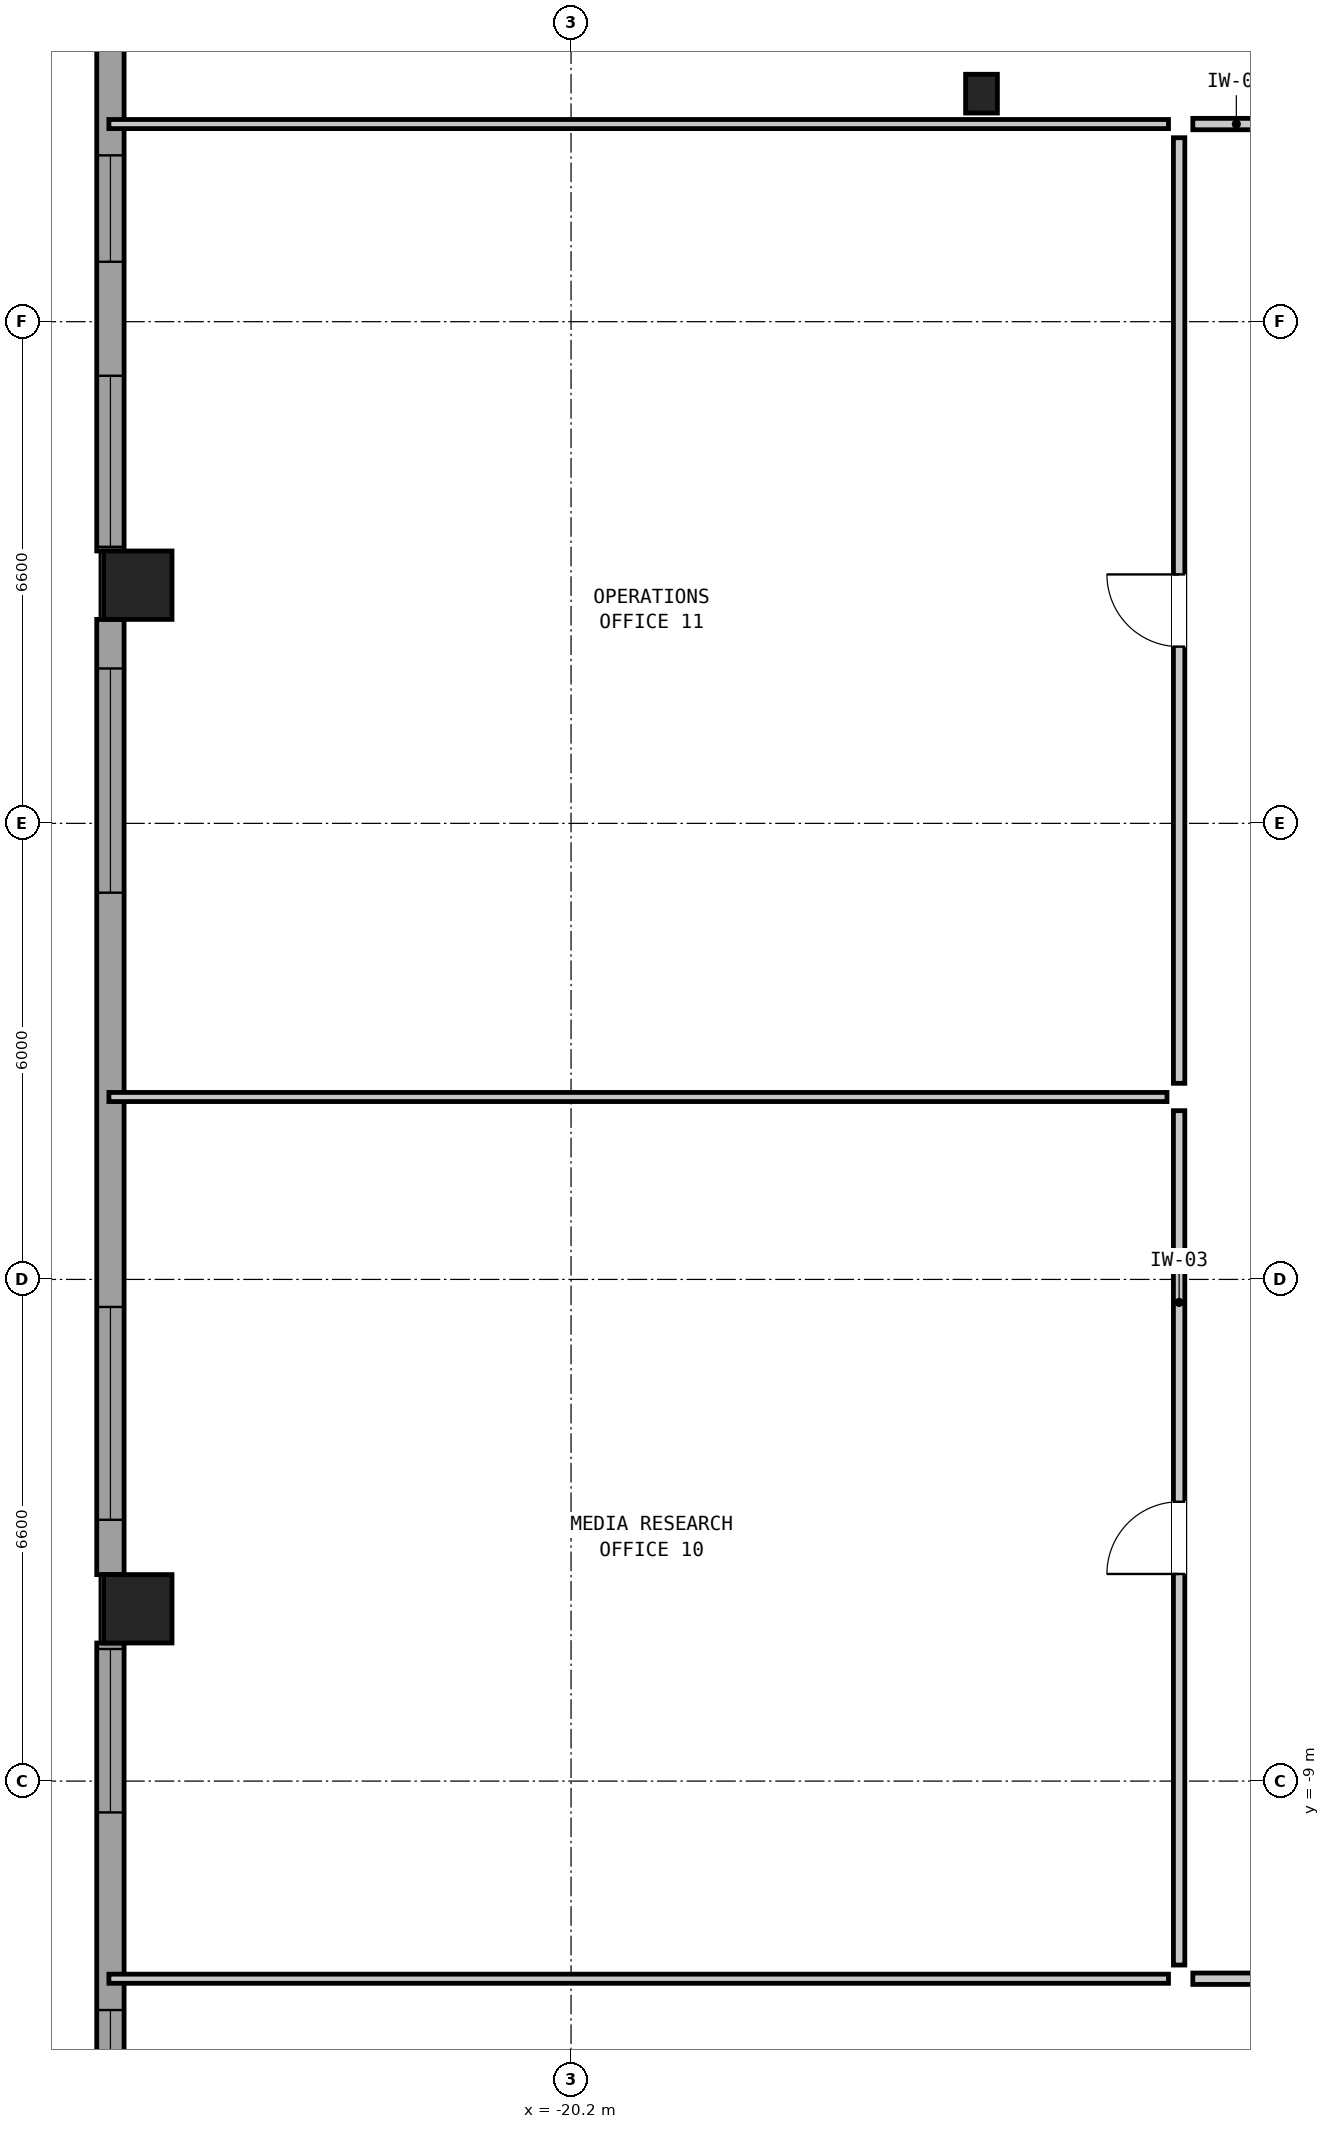
"""IFC4 building model, lengths in metres.
Left out: names, types, materials, properties, quantities, classifications, styles, units other than length and angle.
Written with IfcOpenShell. Run it as: python <this file> out.ifc"""

import sys

from ifc_helpers import new_model, si_unit, direction, frame, frame_2d, origin, origin_2d, place, context, subcontext, project, spatial, rectangle, hollow_rectangle, i_section, extrude, element, fill, save


model = new_model("IFC4")
c1 = context("Model", 3, precision=1e-05, world=origin(), true_north=direction((0.0, 1.0)))
c2 = subcontext(c1, "Body", "Model", "MODEL_VIEW")
j1 = project(units=[si_unit("LENGTHUNIT", "METRE"), si_unit("PLANEANGLEUNIT", "RADIAN")], contexts=[c1])
p1 = place(None, origin())
s1 = spatial("IfcSite", under=j1, at=p1, CompositionType="ELEMENT")
p2 = place(p1, origin())
s2 = spatial("IfcBuilding", under=s1, at=p2, CompositionType="ELEMENT")
p3 = place(p2, frame((0.0, 0.0, 35.25)))
s3 = spatial("IfcBuildingStorey", under=s2, at=p3, CompositionType="ELEMENT", Elevation=35.25)
for number, where, z_axis, x_axis in (
    (1, (-25.9, 6.733, 0.0), (0.0, 0.0, 1.0), (0.0, 1.0, 0.0)),
    (2, (-25.9, -6.733, 0.0), (0.0, 0.0, 1.0), (0.0, 1.0, 0.0)),
):
    element("IfcColumn", number, at=place(p3, frame(where, z_axis=z_axis, x_axis=x_axis)), inside=s3, PredefinedType="COLUMN", context=c2, shape_type="SweptSolid", body=[
        extrude(hollow_rectangle(XDim=0.9, YDim=0.9, WallThickness=0.055, at=origin_2d()), origin(), (0.0, 0.0, 1.0), 3.05),
    ])
p4 = place(p3, frame((-14.8, 13.2, 0.0), z_axis=(0.0, 0.0, 1.0), x_axis=(1.0, 0.0, 0.0)))
e3 = element("IfcColumn", 3, at=p4, inside=s3, PredefinedType="COLUMN", context=c2, shape_type="SweptSolid", body=[
    extrude(i_section(OverallWidth=0.418, OverallDepth=0.51, WebThickness=0.042, FlangeThickness=0.068, at=origin_2d()), origin(), (0.0, 0.0, 1.0), 3.05),
])
p5 = place(p3, frame((-26.26, -19.762, 0.0), z_axis=(0.0, 0.0, 1.0), x_axis=(0.0, 1.0, 0.0)))
e4 = element("IfcWall", 4, at=p5, inside=s3, PredefinedType="SOLIDWALL", context=c2, shape_type="SweptSolid", body=[
    extrude(rectangle(XDim=12.579, YDim=0.36, at=frame_2d((6.289, 0.0))), origin(), (0.0, 0.0, 1.0), 2.067),
])
p6 = place(p5, frame((1.8, 0.0, 0.2)))
e5 = element("IfcOpeningElement", 5, at=p6, cuts=e4, PredefinedType="OPENING", context=c2, shape_type="SweptSolid", body=[
    extrude(rectangle(XDim=2.65, YDim=1.05, at=frame_2d((1.325, 0.525))), frame((0.0, 0.192, 0.0), z_axis=(0.0, -1.0, 0.0), x_axis=(1.0, 0.0, 0.0)), (0.0, 0.0, 1.0), 0.384),
])
p7 = place(p5, frame((6.1, 0.0, 0.75)))
e6 = element("IfcOpeningElement", 6, at=p7, cuts=e4, PredefinedType="OPENING", context=c2, shape_type="SweptSolid", body=[
    extrude(rectangle(XDim=1.65, YDim=1.15, at=frame_2d((0.825, 0.575))), frame((0.0, 0.192, 0.0), z_axis=(0.0, -1.0, 0.0), x_axis=(1.0, 0.0, 0.0)), (0.0, 0.0, 1.0), 0.384),
])
p8 = place(p5, frame((10.35, 0.0, 0.2)))
e7 = element("IfcOpeningElement", 7, at=p8, cuts=e4, PredefinedType="OPENING", context=c2, shape_type="SweptSolid", body=[
    extrude(rectangle(XDim=2.15, YDim=1.2, at=frame_2d((1.075, 0.6))), frame((0.0, 0.192, 0.0), z_axis=(0.0, -1.0, 0.0), x_axis=(1.0, 0.0, 0.0)), (0.0, 0.0, 1.0), 0.384),
])
p9 = place(p3, frame((-26.26, -6.283, 0.0), z_axis=(0.0, 0.0, 1.0), x_axis=(0.0, 1.0, 0.0)))
e8 = element("IfcWall", 8, at=p9, inside=s3, PredefinedType="SOLIDWALL", context=c2, shape_type="SweptSolid", body=[
    extrude(rectangle(XDim=12.566, YDim=0.36, at=frame_2d((6.283, 0.0))), origin(), (0.0, 0.0, 1.0), 2.067),
])
p10 = place(p9, frame((0.721, 0.0, 0.9)))
e9 = element("IfcOpeningElement", 9, at=p10, cuts=e8, PredefinedType="OPENING", context=c2, shape_type="SweptSolid", body=[
    extrude(rectangle(XDim=2.8, YDim=1.0, at=frame_2d((1.4, 0.5))), frame((0.0, 0.192, 0.0), z_axis=(0.0, -1.0, 0.0), x_axis=(1.0, 0.0, 0.0)), (0.0, 0.0, 1.0), 0.384),
])
p11 = place(p9, frame((8.971, 0.0, 0.95)))
e10 = element("IfcOpeningElement", 10, at=p11, cuts=e8, PredefinedType="OPENING", context=c2, shape_type="SweptSolid", body=[
    extrude(rectangle(XDim=2.95, YDim=0.95, at=frame_2d((1.475, 0.475))), frame((0.0, 0.192, 0.0), z_axis=(0.0, -1.0, 0.0), x_axis=(1.0, 0.0, 0.0)), (0.0, 0.0, 1.0), 0.384),
])
p12 = place(p3, frame((-26.26, 7.183, 0.0), z_axis=(0.0, 0.0, 1.0), x_axis=(0.0, 1.0, 0.0)))
e11 = element("IfcWall", 11, at=p12, inside=s3, PredefinedType="SOLIDWALL", context=c2, shape_type="SweptSolid", body=[
    extrude(rectangle(XDim=12.579, YDim=0.36, at=frame_2d((6.289, 0.0))), origin(), (0.0, 0.0, 1.0), 2.067),
])
p13 = place(p12, frame((0.055, 0.0, 0.2)))
e12 = element("IfcOpeningElement", 12, at=p13, cuts=e11, PredefinedType="OPENING", context=c2, shape_type="SweptSolid", body=[
    extrude(rectangle(XDim=2.25, YDim=1.15, at=frame_2d((1.125, 0.575))), frame((0.0, 0.192, 0.0), z_axis=(0.0, -1.0, 0.0), x_axis=(1.0, 0.0, 0.0)), (0.0, 0.0, 1.0), 0.384),
])
p14 = place(p12, frame((3.805, 0.0, 0.95)))
e13 = element("IfcOpeningElement", 13, at=p14, cuts=e11, PredefinedType="OPENING", context=c2, shape_type="SweptSolid", body=[
    extrude(rectangle(XDim=1.4, YDim=0.95, at=frame_2d((0.7, 0.475))), frame((0.0, 0.192, 0.0), z_axis=(0.0, -1.0, 0.0), x_axis=(1.0, 0.0, 0.0)), (0.0, 0.0, 1.0), 0.384),
])
p15 = place(p12, frame((8.055, 0.0, 0.2)))
e14 = element("IfcOpeningElement", 14, at=p15, cuts=e11, PredefinedType="OPENING", context=c2, shape_type="SweptSolid", body=[
    extrude(rectangle(XDim=2.8, YDim=1.0, at=frame_2d((1.4, 0.5))), frame((0.0, 0.192, 0.0), z_axis=(0.0, -1.0, 0.0), x_axis=(1.0, 0.0, 0.0)), (0.0, 0.0, 1.0), 0.384),
])
p16 = place(p3, frame((-26.28, 12.8, 0.0), z_axis=(0.0, 0.0, 1.0), x_axis=(1.0, 0.0, 0.0)))
e15 = element("IfcWall", 15, at=p16, inside=s3, PredefinedType="PARTITIONING", context=c2, shape_type="SweptSolid", body=[
    extrude(rectangle(XDim=13.94, YDim=0.12, at=frame_2d((6.97, 0.0))), origin(), (0.0, 0.0, 1.0), 2.83),
])
p17 = place(p3, frame((-26.28, -11.6, 0.0), z_axis=(0.0, 0.0, 1.0), x_axis=(1.0, 0.0, 0.0)))
e16 = element("IfcWall", 16, at=p17, inside=s3, PredefinedType="PARTITIONING", context=c2, shape_type="SweptSolid", body=[
    extrude(rectangle(XDim=13.94, YDim=0.12, at=frame_2d((6.97, 0.0))), origin(), (0.0, 0.0, 1.0), 2.274),
])
p18 = place(p3, frame((-26.28, 0.0, 0.0), z_axis=(0.0, 0.0, 1.0), x_axis=(1.0, 0.0, 0.0)))
e17 = element("IfcWall", 17, at=p18, inside=s3, PredefinedType="PARTITIONING", context=c2, shape_type="SweptSolid", body=[
    extrude(rectangle(XDim=13.92, YDim=0.12, at=frame_2d((6.96, 0.0))), origin(), (0.0, 0.0, 1.0), 2.83),
])
p19 = place(p3, frame((-12.02, 12.8, 0.0), z_axis=(0.0, 0.0, 1.0), x_axis=(1.0, 0.0, 0.0)))
e18 = element("IfcWall", 18, at=p19, inside=s3, PredefinedType="PARTITIONING", context=c2, shape_type="SweptSolid", body=[
    extrude(rectangle(XDim=3.44, YDim=0.15, at=frame_2d((1.72, 0.0))), origin(), (0.0, 0.0, 1.0), 2.83),
])
p20 = place(p19, frame((1.245, 0.0, 0.0)))
e19 = element("IfcOpeningElement", 19, at=p20, cuts=e18, PredefinedType="OPENING", context=c2, shape_type="SweptSolid", body=[
    extrude(rectangle(XDim=0.95, YDim=2.1, at=frame_2d((0.475, 1.05))), frame((0.0, 0.087, 0.0), z_axis=(0.0, -1.0, 0.0), x_axis=(1.0, 0.0, 0.0)), (0.0, 0.0, 1.0), 0.174),
])
p21 = place(p3, frame((-12.02, -11.6, 0.0), z_axis=(0.0, 0.0, 1.0), x_axis=(1.0, 0.0, 0.0)))
e20 = element("IfcWall", 20, at=p21, inside=s3, PredefinedType="PARTITIONING", context=c2, shape_type="SweptSolid", body=[
    extrude(rectangle(XDim=4.04, YDim=0.15, at=frame_2d((2.02, 0.0))), origin(), (0.0, 0.0, 1.0), 2.274),
])
p22 = place(p21, frame((1.345, 0.0, 0.0)))
e21 = element("IfcOpeningElement", 21, at=p22, cuts=e20, PredefinedType="OPENING", context=c2, shape_type="SweptSolid", body=[
    extrude(rectangle(XDim=0.95, YDim=2.1, at=frame_2d((0.475, 1.05))), frame((0.0, 0.087, 0.0), z_axis=(0.0, -1.0, 0.0), x_axis=(1.0, 0.0, 0.0)), (0.0, 0.0, 1.0), 0.174),
])
p23 = place(p3, frame((-12.2, -11.42, 0.0), z_axis=(0.0, 0.0, 1.0), x_axis=(0.0, 1.0, 0.0)))
e22 = element("IfcWall", 22, at=p23, inside=s3, PredefinedType="PARTITIONING", context=c2, shape_type="SweptSolid", body=[
    extrude(rectangle(XDim=11.24, YDim=0.15, at=frame_2d((5.62, 0.0))), origin(), (0.0, 0.0, 1.0), 2.83),
])
p24 = place(p23, frame((5.145, 0.0, 0.0)))
e23 = element("IfcOpeningElement", 23, at=p24, cuts=e22, PredefinedType="OPENING", context=c2, shape_type="SweptSolid", body=[
    extrude(rectangle(XDim=0.95, YDim=2.1, at=frame_2d((0.475, 1.05))), frame((0.0, 0.087, 0.0), z_axis=(0.0, -1.0, 0.0), x_axis=(1.0, 0.0, 0.0)), (0.0, 0.0, 1.0), 0.174),
])
p25 = place(p3, frame((-12.2, 0.18, 0.0), z_axis=(0.0, 0.0, 1.0), x_axis=(0.0, 1.0, 0.0)))
e24 = element("IfcWall", 24, at=p25, inside=s3, PredefinedType="PARTITIONING", context=c2, shape_type="SweptSolid", body=[
    extrude(rectangle(XDim=12.44, YDim=0.15, at=frame_2d((6.22, 0.0))), origin(), (0.0, 0.0, 1.0), 2.83),
])
p26 = place(p25, frame((5.745, 0.0, 0.0)))
e25 = element("IfcOpeningElement", 25, at=p26, cuts=e24, PredefinedType="OPENING", context=c2, shape_type="SweptSolid", body=[
    extrude(rectangle(XDim=0.95, YDim=2.1, at=frame_2d((0.475, 1.05))), frame((0.0, 0.087, 0.0), z_axis=(0.0, -1.0, 0.0), x_axis=(1.0, 0.0, 0.0)), (0.0, 0.0, 1.0), 0.174),
])
p27 = place(p7, origin())
e26 = element("IfcWindow", 26, at=p27, inside=s3, PartitioningType="SINGLE_PANEL", PredefinedType="WINDOW", context=c2, shape_type="SweptSolid", body=[
    extrude(rectangle(XDim=1.65, YDim=1.15, at=frame_2d((0.825, 0.575))), frame((0.0, 0.03, 0.0), z_axis=(0.0, -1.0, 0.0), x_axis=(1.0, 0.0, 0.0)), (0.0, 0.0, 1.0), 0.06),
])
fill(e6, e26)
p28 = place(p8, origin())
e27 = element("IfcWindow", 27, at=p28, inside=s3, PartitioningType="SINGLE_PANEL", PredefinedType="WINDOW", context=c2, shape_type="SweptSolid", body=[
    extrude(rectangle(XDim=2.15, YDim=1.2, at=frame_2d((1.075, 0.6))), frame((0.0, 0.03, 0.0), z_axis=(0.0, -1.0, 0.0), x_axis=(1.0, 0.0, 0.0)), (0.0, 0.0, 1.0), 0.06),
])
fill(e7, e27)
p29 = place(p10, origin())
e28 = element("IfcWindow", 28, at=p29, inside=s3, PartitioningType="SINGLE_PANEL", PredefinedType="WINDOW", context=c2, shape_type="SweptSolid", body=[
    extrude(rectangle(XDim=2.8, YDim=1.0, at=frame_2d((1.4, 0.5))), frame((0.0, 0.03, 0.0), z_axis=(0.0, -1.0, 0.0), x_axis=(1.0, 0.0, 0.0)), (0.0, 0.0, 1.0), 0.06),
])
fill(e9, e28)
p30 = place(p11, origin())
e29 = element("IfcWindow", 29, at=p30, inside=s3, PartitioningType="SINGLE_PANEL", PredefinedType="WINDOW", context=c2, shape_type="SweptSolid", body=[
    extrude(rectangle(XDim=2.95, YDim=0.95, at=frame_2d((1.475, 0.475))), frame((0.0, 0.03, 0.0), z_axis=(0.0, -1.0, 0.0), x_axis=(1.0, 0.0, 0.0)), (0.0, 0.0, 1.0), 0.06),
])
fill(e10, e29)
p31 = place(p13, origin())
e30 = element("IfcWindow", 30, at=p31, inside=s3, PartitioningType="SINGLE_PANEL", PredefinedType="WINDOW", context=c2, shape_type="SweptSolid", body=[
    extrude(rectangle(XDim=2.25, YDim=1.15, at=frame_2d((1.125, 0.575))), frame((0.0, 0.03, 0.0), z_axis=(0.0, -1.0, 0.0), x_axis=(1.0, 0.0, 0.0)), (0.0, 0.0, 1.0), 0.06),
])
fill(e12, e30)
p32 = place(p14, origin())
e31 = element("IfcWindow", 31, at=p32, inside=s3, PartitioningType="SINGLE_PANEL", PredefinedType="WINDOW", context=c2, shape_type="SweptSolid", body=[
    extrude(rectangle(XDim=1.4, YDim=0.95, at=frame_2d((0.7, 0.475))), frame((0.0, 0.03, 0.0), z_axis=(0.0, -1.0, 0.0), x_axis=(1.0, 0.0, 0.0)), (0.0, 0.0, 1.0), 0.06),
])
fill(e13, e31)
p33 = place(p24, origin())
e32 = element("IfcDoor", 32, at=p33, inside=s3, OperationType="SINGLE_SWING_LEFT", PredefinedType="DOOR", context=c2, shape_type="SweptSolid", body=[
    extrude(rectangle(XDim=0.95, YDim=2.1, at=frame_2d((0.475, 1.05))), frame((0.0, 0.025, 0.0), z_axis=(0.0, -1.0, 0.0), x_axis=(1.0, 0.0, 0.0)), (0.0, 0.0, 1.0), 0.05),
])
fill(e23, e32)
p34 = place(p26, origin())
e33 = element("IfcDoor", 33, at=p34, inside=s3, OperationType="SINGLE_SWING_RIGHT", PredefinedType="DOOR", context=c2, shape_type="SweptSolid", body=[
    extrude(rectangle(XDim=0.95, YDim=2.1, at=frame_2d((0.475, 1.05))), frame((0.0, 0.025, 0.0), z_axis=(0.0, -1.0, 0.0), x_axis=(1.0, 0.0, 0.0)), (0.0, 0.0, 1.0), 0.05),
])
fill(e25, e33)
save(model, sys.argv[1])
